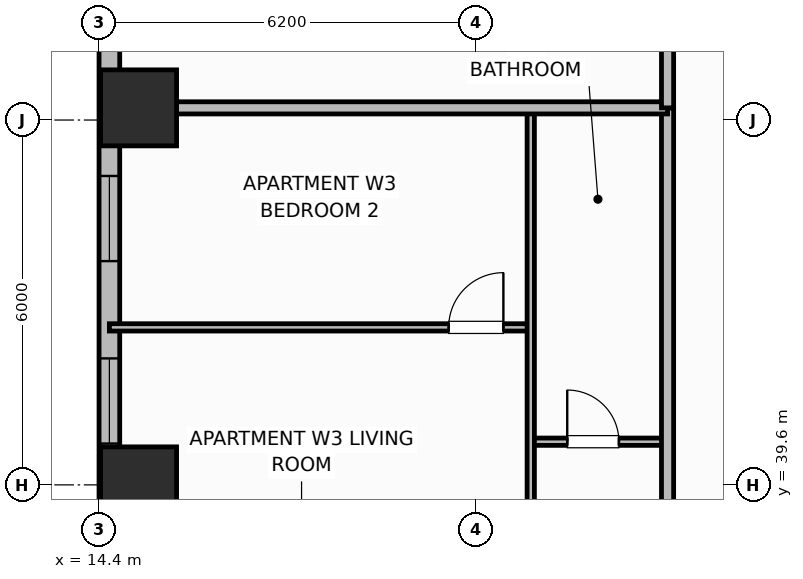
"""IFC4 building model, lengths in metres.
Left out: names, types, materials, properties, quantities, classifications, styles, units other than length and angle.
Written with IfcOpenShell. Run it as: python <this file> out.ifc"""

import sys

from ifc_helpers import new_model, si_unit, direction, frame, frame_2d, origin, origin_2d, place, context, subcontext, project, spatial, rectangle, extrude, element, fill, save


model = new_model("IFC4")
c1 = context("Model", 3, precision=1e-05, world=origin(), true_north=direction((0.0, 1.0)))
c2 = subcontext(c1, "Body", "Model", "MODEL_VIEW")
j1 = project(units=[si_unit("LENGTHUNIT", "METRE"), si_unit("PLANEANGLEUNIT", "RADIAN")], contexts=[c1])
p1 = place(None, origin())
s1 = spatial("IfcSite", under=j1, at=p1, CompositionType="ELEMENT")
p2 = place(p1, origin())
s2 = spatial("IfcBuilding", under=s1, at=p2, CompositionType="ELEMENT")
p3 = place(p2, frame((0.0, 0.0, 73.2)))
s3 = spatial("IfcBuildingStorey", under=s2, at=p3, CompositionType="ELEMENT", Elevation=73.2)
for number, where, z_axis, x_axis in (
    (1, (15.05, 39.6, 0.0), (0.0, 0.0, 1.0), (1.0, 0.0, 0.0)),
    (2, (15.05, 45.8, 0.0), (0.0, 0.0, 1.0), (1.0, 0.0, 0.0)),
):
    element("IfcColumn", number, at=place(p3, frame(where, z_axis=z_axis, x_axis=x_axis)), inside=s3, PredefinedType="COLUMN", context=c2, shape_type="SweptSolid", body=[
        extrude(rectangle(XDim=1.25, YDim=1.25, at=origin_2d()), origin(), (0.0, 0.0, 1.0), 3.7),
    ])
p4 = place(p3, frame((14.57, 47.4, 0.0), z_axis=(0.0, 0.0, 1.0), x_axis=(0.0, -1.0, 0.0)))
e3 = element("IfcWall", 3, at=p4, inside=s3, PredefinedType="SOLIDWALL", context=c2, shape_type="SweptSolid", body=[
    extrude(rectangle(XDim=14.8, YDim=0.34, at=frame_2d((7.4, 0.0))), origin(), (0.0, 0.0, 1.0), 2.66),
])
p5 = place(p4, frame((2.72, 0.0, 0.65)))
e4 = element("IfcOpeningElement", 4, at=p5, cuts=e3, PredefinedType="OPENING", context=c2, shape_type="SweptSolid", body=[
    extrude(rectangle(XDim=1.4, YDim=1.85, at=frame_2d((0.7, 0.925))), frame((0.0, 0.18, 0.0), z_axis=(0.0, -1.0, 0.0), x_axis=(1.0, 0.0, 0.0)), (0.0, 0.0, 1.0), 0.36),
])
p6 = place(p4, frame((5.72, 0.0, 0.65)))
e5 = element("IfcOpeningElement", 5, at=p6, cuts=e3, PredefinedType="OPENING", context=c2, shape_type="SweptSolid", body=[
    extrude(rectangle(XDim=1.4, YDim=1.85, at=frame_2d((0.7, 0.925))), frame((0.0, 0.18, 0.0), z_axis=(0.0, -1.0, 0.0), x_axis=(1.0, 0.0, 0.0)), (0.0, 0.0, 1.0), 0.36),
])
p7 = place(p4, frame((13.2, 0.0, 0.65)))
e6 = element("IfcOpeningElement", 6, at=p7, cuts=e3, PredefinedType="OPENING", context=c2, shape_type="SweptSolid", body=[
    extrude(rectangle(XDim=1.4, YDim=1.85, at=frame_2d((0.7, 0.925))), frame((0.0, 0.18, 0.0), z_axis=(0.0, -1.0, 0.0), x_axis=(1.0, 0.0, 0.0)), (0.0, 0.0, 1.0), 0.36),
])
p8 = place(p3, frame((21.5, 40.31, 0.0), z_axis=(0.0, 0.0, 1.0), x_axis=(1.0, 0.0, 0.0)))
e7 = element("IfcWall", 7, at=p8, inside=s3, PredefinedType="PARTITIONING", context=c2, shape_type="SweptSolid", body=[
    extrude(rectangle(XDim=2.25, YDim=0.12, at=frame_2d((1.125, 0.0))), origin(), (0.0, 0.0, 1.0), 2.49),
])
p9 = place(p8, frame((0.6, 0.0, 0.0)))
e8 = element("IfcOpeningElement", 8, at=p9, cuts=e7, PredefinedType="OPENING", context=c2, shape_type="SweptSolid", body=[
    extrude(rectangle(XDim=0.85, YDim=2.1, at=frame_2d((0.425, 1.05))), frame((0.0, 0.07, 0.0), z_axis=(0.0, -1.0, 0.0), x_axis=(1.0, 0.0, 0.0)), (0.0, 0.0, 1.0), 0.14),
])
p10 = place(p3, frame((14.57, 42.19, 0.0), z_axis=(0.0, 0.0, 1.0), x_axis=(1.0, 0.0, 0.0)))
e9 = element("IfcWall", 9, at=p10, inside=s3, PredefinedType="PARTITIONING", context=c2, shape_type="SweptSolid", body=[
    extrude(rectangle(XDim=6.93, YDim=0.12, at=frame_2d((3.465, 0.0))), origin(), (0.0, 0.0, 1.0), 2.49),
])
p11 = place(p10, frame((5.58, 0.0, 0.0)))
e10 = element("IfcOpeningElement", 10, at=p11, cuts=e9, PredefinedType="OPENING", context=c2, shape_type="SweptSolid", body=[
    extrude(rectangle(XDim=0.9, YDim=2.1, at=frame_2d((0.45, 1.05))), frame((0.0, 0.07, 0.0), z_axis=(0.0, -1.0, 0.0), x_axis=(1.0, 0.0, 0.0)), (0.0, 0.0, 1.0), 0.14),
])
p12 = place(p3, frame((21.5, 35.28, 0.0), z_axis=(0.0, 0.0, 1.0), x_axis=(0.0, 1.0, 0.0)))
e11 = element("IfcWall", 11, at=p12, inside=s3, PredefinedType="PARTITIONING", context=c2, shape_type="SweptSolid", body=[
    extrude(rectangle(XDim=10.48, YDim=0.12, at=frame_2d((5.24, 0.0))), origin(), (0.0, 0.0, 1.0), 2.49),
])
p13 = place(p12, frame((0.41, 0.0, 0.0)))
e12 = element("IfcOpeningElement", 12, at=p13, cuts=e11, PredefinedType="OPENING", context=c2, shape_type="SweptSolid", body=[
    extrude(rectangle(XDim=0.9, YDim=2.1, at=frame_2d((0.45, 1.05))), frame((0.0, 0.07, 0.0), z_axis=(0.0, -1.0, 0.0), x_axis=(1.0, 0.0, 0.0)), (0.0, 0.0, 1.0), 0.14),
])
p14 = place(p3, frame((23.75, 10.6, 0.0), z_axis=(0.0, 0.0, 1.0), x_axis=(0.0, 1.0, 0.0)))
e13 = element("IfcWall", 13, at=p14, inside=s3, PredefinedType="PARTITIONING", context=c2, shape_type="SweptSolid", body=[
    extrude(rectangle(XDim=35.2, YDim=0.2, at=frame_2d((17.6, 0.0))), origin(), (0.0, 0.0, 1.0), 2.49),
])
p15 = place(p14, frame((2.65, 0.0, 0.0)))
e14 = element("IfcOpeningElement", 14, at=p15, cuts=e13, PredefinedType="OPENING", context=c2, shape_type="SweptSolid", body=[
    extrude(rectangle(XDim=1.0, YDim=2.15, at=frame_2d((0.5, 1.075))), frame((0.0, 0.11, 0.0), z_axis=(0.0, -1.0, 0.0), x_axis=(1.0, 0.0, 0.0)), (0.0, 0.0, 1.0), 0.22),
])
p16 = place(p14, frame((13.222, 0.0, 0.0)))
e15 = element("IfcOpeningElement", 15, at=p16, cuts=e13, PredefinedType="OPENING", context=c2, shape_type="SweptSolid", body=[
    extrude(rectangle(XDim=1.0, YDim=2.15, at=frame_2d((0.5, 1.075))), frame((0.0, 0.11, 0.0), z_axis=(0.0, -1.0, 0.0), x_axis=(1.0, 0.0, 0.0)), (0.0, 0.0, 1.0), 0.22),
])
p17 = place(p14, frame((25.19, 0.0, 0.0)))
e16 = element("IfcOpeningElement", 16, at=p17, cuts=e13, PredefinedType="OPENING", context=c2, shape_type="SweptSolid", body=[
    extrude(rectangle(XDim=1.0, YDim=2.15, at=frame_2d((0.5, 1.075))), frame((0.0, 0.11, 0.0), z_axis=(0.0, -1.0, 0.0), x_axis=(1.0, 0.0, 0.0)), (0.0, 0.0, 1.0), 0.22),
])
p18 = place(p3, frame((14.99, 45.8, 0.0), z_axis=(0.0, 0.0, 1.0), x_axis=(1.0, 0.0, 0.0)))
e17 = element("IfcWall", 17, at=p18, inside=s3, PredefinedType="PARTITIONING", context=c2, shape_type="SweptSolid", body=[
    extrude(rectangle(XDim=8.76, YDim=0.2, at=frame_2d((4.38, 0.0))), origin(), (0.0, 0.0, 1.0), 2.49),
])
p19 = place(p3, frame((23.75, 45.8, 0.0), z_axis=(0.0, 0.0, 1.0), x_axis=(0.0, 1.0, 0.0)))
e18 = element("IfcWall", 18, at=p19, inside=s3, PredefinedType="PARTITIONING", context=c2, shape_type="SweptSolid", body=[
    extrude(rectangle(XDim=5.63, YDim=0.2, at=frame_2d((2.815, 0.0))), origin(), (0.0, 0.0, 1.0), 2.49),
])
p20 = place(p5, origin())
e19 = element("IfcWindow", 19, at=p20, inside=s3, PartitioningType="SINGLE_PANEL", PredefinedType="WINDOW", context=c2, shape_type="SweptSolid", body=[
    extrude(rectangle(XDim=1.4, YDim=1.85, at=frame_2d((0.7, 0.925))), frame((0.0, 0.03, 0.0), z_axis=(0.0, -1.0, 0.0), x_axis=(1.0, 0.0, 0.0)), (0.0, 0.0, 1.0), 0.06),
])
fill(e4, e19)
p21 = place(p6, origin())
e20 = element("IfcWindow", 20, at=p21, inside=s3, PartitioningType="SINGLE_PANEL", PredefinedType="WINDOW", context=c2, shape_type="SweptSolid", body=[
    extrude(rectangle(XDim=1.4, YDim=1.85, at=frame_2d((0.7, 0.925))), frame((0.0, 0.03, 0.0), z_axis=(0.0, -1.0, 0.0), x_axis=(1.0, 0.0, 0.0)), (0.0, 0.0, 1.0), 0.06),
])
fill(e5, e20)
p22 = place(p9, origin())
e21 = element("IfcDoor", 21, at=p22, inside=s3, OperationType="SINGLE_SWING_LEFT", PredefinedType="DOOR", context=c2, shape_type="SweptSolid", body=[
    extrude(rectangle(XDim=0.85, YDim=2.1, at=frame_2d((0.425, 1.05))), frame((0.0, 0.025, 0.0), z_axis=(0.0, -1.0, 0.0), x_axis=(1.0, 0.0, 0.0)), (0.0, 0.0, 1.0), 0.05),
])
fill(e8, e21)
p23 = place(p11, origin())
e22 = element("IfcDoor", 22, at=p23, inside=s3, OperationType="SINGLE_SWING_RIGHT", PredefinedType="DOOR", context=c2, shape_type="SweptSolid", body=[
    extrude(rectangle(XDim=0.9, YDim=2.1, at=frame_2d((0.45, 1.05))), frame((0.0, 0.025, 0.0), z_axis=(0.0, -1.0, 0.0), x_axis=(1.0, 0.0, 0.0)), (0.0, 0.0, 1.0), 0.05),
])
fill(e10, e22)
save(model, sys.argv[1])
